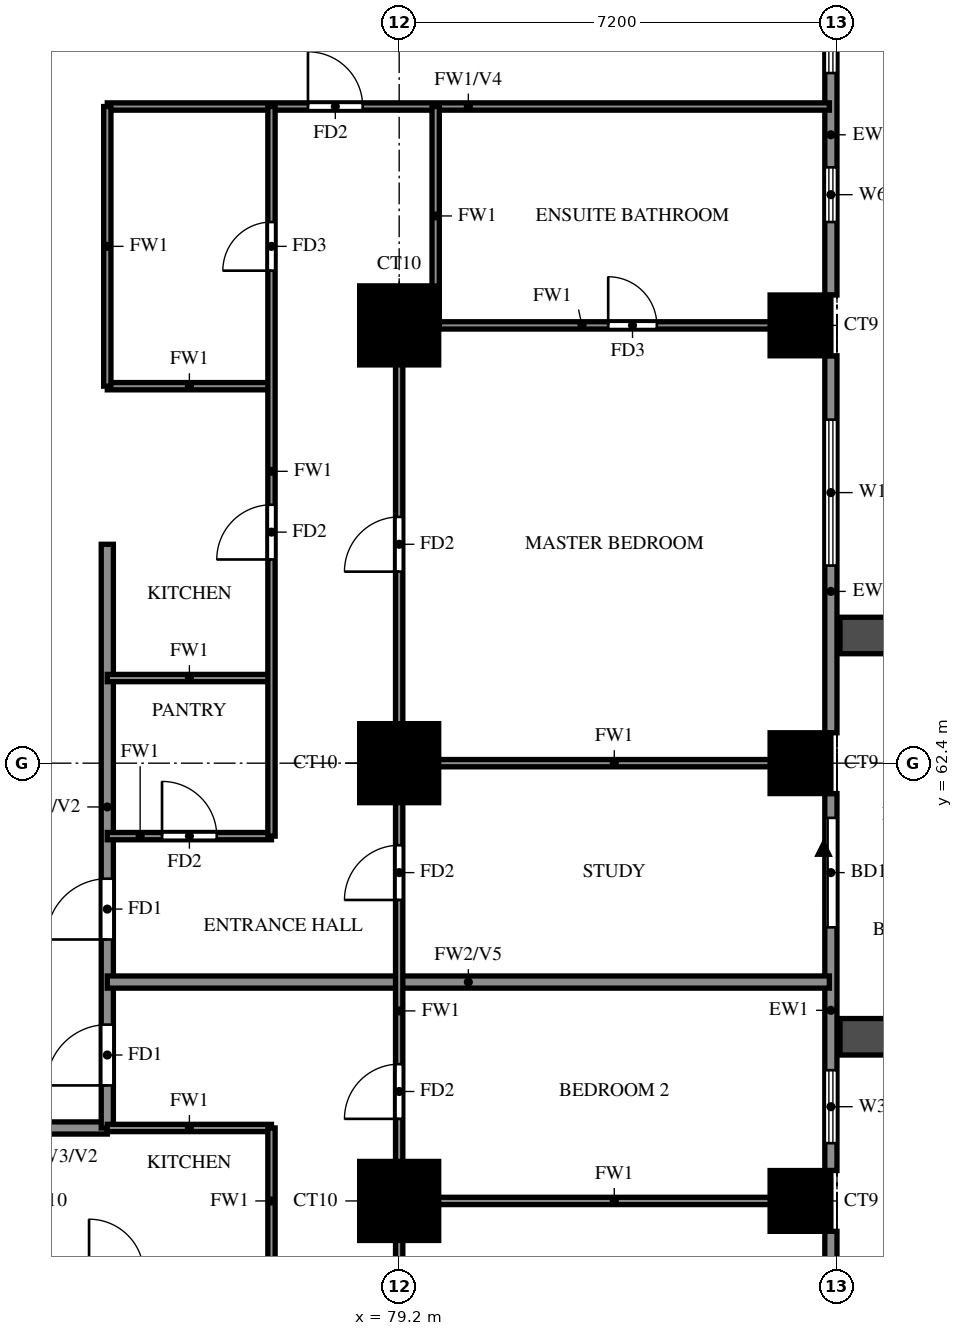
"""IFC4 building model, lengths in metres.
Left out: names, types, materials, properties, quantities, classifications, styles, units other than length and angle.
Written with IfcOpenShell. Run it as: python <this file> out.ifc"""

import sys

from ifc_helpers import new_model, si_unit, direction, frame, frame_2d, origin, origin_2d, place, context, subcontext, project, spatial, rectangle, extrude, source, transform, mapped, element, fill, save


model = new_model("IFC4")
c1 = context("Model", 3, precision=1e-05, world=origin(), true_north=direction((0.0, 1.0)))
c2 = subcontext(c1, "Body", "Model", "MODEL_VIEW")
j1 = project(units=[si_unit("LENGTHUNIT", "METRE"), si_unit("PLANEANGLEUNIT", "RADIAN")], contexts=[c1])
p1 = place(None, origin())
s1 = spatial("IfcSite", under=j1, at=p1, CompositionType="ELEMENT")
p2 = place(p1, origin())
s2 = spatial("IfcBuilding", under=s1, at=p2, CompositionType="ELEMENT")
p3 = place(p2, frame((0.0, 0.0, 83.0)))
s3 = spatial("IfcBuildingStorey", under=s2, at=p3, CompositionType="ELEMENT", Elevation=83.0)
m1 = source(origin(), c2, "Body", "SweptSolid", [
    extrude(rectangle(XDim=1.3, YDim=1.3, at=origin_2d()), origin(), (0.0, 0.0, 1.0), 3.18),
])
p4 = place(p3, frame((79.2, 55.2, 0.0), z_axis=(0.0, 0.0, 1.0), x_axis=(1.0, 0.0, 0.0)))
e1 = element("IfcColumn", 1, at=p4, inside=s3, PredefinedType="COLUMN", context=c2, shape_type="MappedRepresentation", body=[
    mapped(m1, transform((0.0, 0.0, 0.0))),
])
m2 = source(origin(), c2, "Body", "SweptSolid", [
    extrude(rectangle(XDim=1.0, YDim=1.0, at=origin_2d()), origin(), (0.0, 0.0, 1.0), 3.18),
])
p5 = place(p3, frame((85.8, 55.2, 0.0), z_axis=(0.0, 0.0, 1.0), x_axis=(1.0, 0.0, 0.0)))
e2 = element("IfcColumn", 2, at=p5, inside=s3, PredefinedType="COLUMN", context=c2, shape_type="MappedRepresentation", body=[
    mapped(m2, transform((0.0, 0.0, 0.0))),
])
p6 = place(p3, frame((79.2, 62.4, 0.0), z_axis=(0.0, 0.0, 1.0), x_axis=(1.0, 0.0, 0.0)))
e3 = element("IfcColumn", 3, at=p6, inside=s3, PredefinedType="COLUMN", context=c2, shape_type="MappedRepresentation", body=[
    mapped(m1, transform((0.0, 0.0, 0.0))),
])
p7 = place(p3, frame((85.8, 62.4, 0.0), z_axis=(0.0, 0.0, 1.0), x_axis=(1.0, 0.0, 0.0)))
e4 = element("IfcColumn", 4, at=p7, inside=s3, PredefinedType="COLUMN", context=c2, shape_type="MappedRepresentation", body=[
    mapped(m2, transform((0.0, 0.0, 0.0))),
])
p8 = place(p3, frame((79.2, 69.6, 0.0), z_axis=(0.0, 0.0, 1.0), x_axis=(1.0, 0.0, 0.0)))
e5 = element("IfcColumn", 5, at=p8, inside=s3, PredefinedType="COLUMN", context=c2, shape_type="MappedRepresentation", body=[
    mapped(m1, transform((0.0, 0.0, 0.0))),
])
p9 = place(p3, frame((85.8, 69.6, 0.0), z_axis=(0.0, 0.0, 1.0), x_axis=(1.0, 0.0, 0.0)))
e6 = element("IfcColumn", 6, at=p9, inside=s3, PredefinedType="COLUMN", context=c2, shape_type="MappedRepresentation", body=[
    mapped(m2, transform((0.0, 0.0, 0.0))),
])
p10 = place(p3, frame((86.3, 48.5, 0.0), z_axis=(0.0, 0.0, 1.0), x_axis=(0.0, 1.0, 0.0)))
e7 = element("IfcWall", 7, at=p10, inside=s3, PredefinedType="SOLIDWALL", context=c2, shape_type="SweptSolid", body=[
    extrude(rectangle(XDim=6.2, YDim=0.2, at=frame_2d((3.1, 0.0))), origin(), (0.0, 0.0, 1.0), 3.18),
])
p11 = place(p10, frame((1.9, 0.0, 0.6)))
e8 = element("IfcOpeningElement", 8, at=p11, cuts=e7, PredefinedType="OPENING", context=c2, shape_type="SweptSolid", body=[
    extrude(rectangle(XDim=2.4, YDim=2.4, at=frame_2d((1.2, 1.2))), frame((0.0, 0.11, 0.0), z_axis=(0.0, -1.0, 0.0), x_axis=(1.0, 0.0, 0.0)), (0.0, 0.0, 1.0), 0.22),
])
p12 = place(p3, frame((86.3, 55.7, 0.0), z_axis=(0.0, 0.0, 1.0), x_axis=(0.0, 1.0, 0.0)))
e9 = element("IfcWall", 9, at=p12, inside=s3, PredefinedType="SOLIDWALL", context=c2, shape_type="SweptSolid", body=[
    extrude(rectangle(XDim=6.2, YDim=0.2, at=frame_2d((3.1, 0.0))), origin(), (0.0, 0.0, 1.0), 3.18),
])
p13 = place(p12, frame((4.0, 0.0, 0.0)))
e10 = element("IfcOpeningElement", 10, at=p13, cuts=e9, PredefinedType="OPENING", context=c2, shape_type="SweptSolid", body=[
    extrude(rectangle(XDim=1.8, YDim=2.4, at=frame_2d((0.9, 1.2))), frame((0.0, 0.11, 0.0), z_axis=(0.0, -1.0, 0.0), x_axis=(1.0, 0.0, 0.0)), (0.0, 0.0, 1.0), 0.22),
])
p14 = place(p12, frame((0.45, 0.0, 0.6)))
e11 = element("IfcOpeningElement", 11, at=p14, cuts=e9, PredefinedType="OPENING", context=c2, shape_type="SweptSolid", body=[
    extrude(rectangle(XDim=1.2, YDim=2.4, at=frame_2d((0.6, 1.2))), frame((0.0, 0.11, 0.0), z_axis=(0.0, -1.0, 0.0), x_axis=(1.0, 0.0, 0.0)), (0.0, 0.0, 1.0), 0.22),
])
p15 = place(p3, frame((86.3, 62.9, 0.0), z_axis=(0.0, 0.0, 1.0), x_axis=(0.0, 1.0, 0.0)))
e12 = element("IfcWall", 12, at=p15, inside=s3, PredefinedType="SOLIDWALL", context=c2, shape_type="SweptSolid", body=[
    extrude(rectangle(XDim=6.2, YDim=0.2, at=frame_2d((3.1, 0.0))), origin(), (0.0, 0.0, 1.0), 3.18),
])
p16 = place(p15, frame((2.75, 0.0, 0.6)))
e13 = element("IfcOpeningElement", 13, at=p16, cuts=e12, PredefinedType="OPENING", context=c2, shape_type="SweptSolid", body=[
    extrude(rectangle(XDim=2.4, YDim=2.4, at=frame_2d((1.2, 1.2))), frame((0.0, 0.11, 0.0), z_axis=(0.0, -1.0, 0.0), x_axis=(1.0, 0.0, 0.0)), (0.0, 0.0, 1.0), 0.22),
])
p17 = place(p3, frame((86.3, 70.1, 0.0), z_axis=(0.0, 0.0, 1.0), x_axis=(0.0, 1.0, 0.0)))
e14 = element("IfcWall", 14, at=p17, inside=s3, PredefinedType="SOLIDWALL", context=c2, shape_type="SweptSolid", body=[
    extrude(rectangle(XDim=6.2, YDim=0.2, at=frame_2d((3.1, 0.0))), origin(), (0.0, 0.0, 1.0), 3.18),
])
p18 = place(p17, frame((1.2, 0.0, 1.5)))
e15 = element("IfcOpeningElement", 15, at=p18, cuts=e14, PredefinedType="OPENING", context=c2, shape_type="SweptSolid", body=[
    extrude(rectangle(XDim=0.9, YDim=0.9, at=frame_2d((0.45, 0.45))), frame((0.0, 0.11, 0.0), z_axis=(0.0, -1.0, 0.0), x_axis=(1.0, 0.0, 0.0)), (0.0, 0.0, 1.0), 0.22),
])
p19 = place(p17, frame((3.65, 0.0, 0.6)))
e16 = element("IfcOpeningElement", 16, at=p19, cuts=e14, PredefinedType="OPENING", context=c2, shape_type="SweptSolid", body=[
    extrude(rectangle(XDim=1.8, YDim=2.4, at=frame_2d((0.9, 1.2))), frame((0.0, 0.11, 0.0), z_axis=(0.0, -1.0, 0.0), x_axis=(1.0, 0.0, 0.0)), (0.0, 0.0, 1.0), 0.22),
])
for number, where, z_axis, x_axis in (
    (17, (86.45, 57.9, 0.0), (0.0, 0.0, 1.0), (1.0, 0.0, 0.0)),
    (18, (86.45, 64.5, 0.0), (0.0, 0.0, 1.0), (1.0, 0.0, 0.0)),
):
    element("IfcWall", number, at=place(p3, frame(where, z_axis=z_axis, x_axis=x_axis)), inside=s3, PredefinedType="SOLIDWALL", context=c2, shape_type="SweptSolid", body=[
        extrude(rectangle(XDim=2.65, YDim=0.6, at=frame_2d((1.325, 0.0))), origin(), (0.0, 0.0, 1.0), 2.85),
    ])
p20 = place(p3, frame((72.0, 56.4, 0.0), z_axis=(0.0, 0.0, 1.0), x_axis=(1.0, 0.0, 0.0)))
e19 = element("IfcWall", 19, at=p20, inside=s3, PredefinedType="SOLIDWALL", context=c2, shape_type="SweptSolid", body=[
    extrude(rectangle(XDim=2.4, YDim=0.2, at=frame_2d((1.2, 0.0))), origin(), (0.0, 0.0, 1.0), 3.18),
])
p21 = place(p3, frame((74.4, 56.4, 0.0), z_axis=(0.0, 0.0, 1.0), x_axis=(0.0, 1.0, 0.0)))
e20 = element("IfcWall", 20, at=p21, inside=s3, PredefinedType="SOLIDWALL", context=c2, shape_type="SweptSolid", body=[
    extrude(rectangle(XDim=9.6, YDim=0.2, at=frame_2d((4.8, 0.0))), origin(), (0.0, 0.0, 1.0), 3.18),
])
p22 = place(p21, frame((0.7, 0.0, 0.0)))
e21 = element("IfcOpeningElement", 21, at=p22, cuts=e20, PredefinedType="OPENING", context=c2, shape_type="SweptSolid", body=[
    extrude(rectangle(XDim=1.0, YDim=2.1, at=frame_2d((0.5, 1.05))), frame((0.0, 0.11, 0.0), z_axis=(0.0, -1.0, 0.0), x_axis=(1.0, 0.0, 0.0)), (0.0, 0.0, 1.0), 0.22),
])
p23 = place(p21, frame((3.1, 0.0, 0.0)))
e22 = element("IfcOpeningElement", 22, at=p23, cuts=e20, PredefinedType="OPENING", context=c2, shape_type="SweptSolid", body=[
    extrude(rectangle(XDim=1.0, YDim=2.1, at=frame_2d((0.5, 1.05))), frame((0.0, 0.11, 0.0), z_axis=(0.0, -1.0, 0.0), x_axis=(1.0, 0.0, 0.0)), (0.0, 0.0, 1.0), 0.22),
])
p24 = place(p3, frame((74.4, 58.8, 0.0), z_axis=(0.0, 0.0, 1.0), x_axis=(1.0, 0.0, 0.0)))
e23 = element("IfcWall", 23, at=p24, inside=s3, PredefinedType="SOLIDWALL", context=c2, shape_type="SweptSolid", body=[
    extrude(rectangle(XDim=11.875, YDim=0.2, at=frame_2d((5.938, 0.0))), origin(), (0.0, 0.0, 1.0), 2.28),
])
p25 = place(p3, frame((79.2, 55.2, 0.0), z_axis=(0.0, 0.0, 1.0), x_axis=(1.0, 0.0, 0.0)))
e24 = element("IfcWall", 24, at=p25, inside=s3, PredefinedType="PARTITIONING", context=c2, shape_type="SweptSolid", body=[
    extrude(rectangle(XDim=7.075, YDim=0.12, at=frame_2d((3.538, 0.0))), origin(), (0.0, 0.0, 1.0), 3.18),
])
p26 = place(p3, frame((74.4, 56.4, 0.0), z_axis=(0.0, 0.0, 1.0), x_axis=(1.0, 0.0, 0.0)))
e25 = element("IfcWall", 25, at=p26, inside=s3, PredefinedType="PARTITIONING", context=c2, shape_type="SweptSolid", body=[
    extrude(rectangle(XDim=2.7, YDim=0.12, at=frame_2d((1.35, 0.0))), origin(), (0.0, 0.0, 1.0), 3.18),
])
p27 = place(p3, frame((74.4, 61.2, 0.0), z_axis=(0.0, 0.0, 1.0), x_axis=(1.0, 0.0, 0.0)))
e26 = element("IfcWall", 26, at=p27, inside=s3, PredefinedType="PARTITIONING", context=c2, shape_type="SweptSolid", body=[
    extrude(rectangle(XDim=2.7, YDim=0.12, at=frame_2d((1.35, 0.0))), origin(), (0.0, 0.0, 1.0), 3.18),
])
p28 = place(p27, frame((0.9, 0.0, 0.0)))
e27 = element("IfcOpeningElement", 27, at=p28, cuts=e26, PredefinedType="OPENING", context=c2, shape_type="SweptSolid", body=[
    extrude(rectangle(XDim=0.9, YDim=2.1, at=frame_2d((0.45, 1.05))), frame((0.0, 0.07, 0.0), z_axis=(0.0, -1.0, 0.0), x_axis=(1.0, 0.0, 0.0)), (0.0, 0.0, 1.0), 0.14),
])
p29 = place(p3, frame((79.2, 62.4, 0.0), z_axis=(0.0, 0.0, 1.0), x_axis=(1.0, 0.0, 0.0)))
e28 = element("IfcWall", 28, at=p29, inside=s3, PredefinedType="PARTITIONING", context=c2, shape_type="SweptSolid", body=[
    extrude(rectangle(XDim=7.075, YDim=0.12, at=frame_2d((3.538, 0.0))), origin(), (0.0, 0.0, 1.0), 3.18),
])
for number, where, z_axis, x_axis in (
    (29, (74.4, 63.8, 0.0), (0.0, 0.0, 1.0), (1.0, 0.0, 0.0)),
    (30, (74.4, 68.6, 0.0), (0.0, 0.0, 1.0), (1.0, 0.0, 0.0)),
):
    element("IfcWall", number, at=place(p3, frame(where, z_axis=z_axis, x_axis=x_axis)), inside=s3, PredefinedType="PARTITIONING", context=c2, shape_type="SweptSolid", body=[
        extrude(rectangle(XDim=2.7, YDim=0.12, at=frame_2d((1.35, 0.0))), origin(), (0.0, 0.0, 1.0), 3.18),
    ])
p30 = place(p3, frame((79.2, 69.6, 0.0), z_axis=(0.0, 0.0, 1.0), x_axis=(1.0, 0.0, 0.0)))
e31 = element("IfcWall", 31, at=p30, inside=s3, PredefinedType="PARTITIONING", context=c2, shape_type="SweptSolid", body=[
    extrude(rectangle(XDim=7.075, YDim=0.12, at=frame_2d((3.538, 0.0))), origin(), (0.0, 0.0, 1.0), 3.18),
])
p31 = place(p30, frame((3.438, 0.0, 0.0)))
e32 = element("IfcOpeningElement", 32, at=p31, cuts=e31, PredefinedType="OPENING", context=c2, shape_type="SweptSolid", body=[
    extrude(rectangle(XDim=0.8, YDim=2.1, at=frame_2d((0.4, 1.05))), frame((0.0, 0.07, 0.0), z_axis=(0.0, -1.0, 0.0), x_axis=(1.0, 0.0, 0.0)), (0.0, 0.0, 1.0), 0.14),
])
p32 = place(p3, frame((74.4, 73.2, 0.0), z_axis=(0.0, 0.0, 1.0), x_axis=(1.0, 0.0, 0.0)))
e33 = element("IfcWall", 33, at=p32, inside=s3, PredefinedType="PARTITIONING", context=c2, shape_type="SweptSolid", body=[
    extrude(rectangle(XDim=11.875, YDim=0.12, at=frame_2d((5.938, 0.0))), origin(), (0.0, 0.0, 1.0), 2.28),
])
p33 = place(p32, frame((3.3, 0.0, 0.0)))
e34 = element("IfcOpeningElement", 34, at=p33, cuts=e33, PredefinedType="OPENING", context=c2, shape_type="SweptSolid", body=[
    extrude(rectangle(XDim=0.9, YDim=2.1, at=frame_2d((0.45, 1.05))), frame((0.0, 0.07, 0.0), z_axis=(0.0, -1.0, 0.0), x_axis=(1.0, 0.0, 0.0)), (0.0, 0.0, 1.0), 0.14),
])
p34 = place(p3, frame((74.4, 68.6, 0.0), z_axis=(0.0, 0.0, 1.0), x_axis=(0.0, 1.0, 0.0)))
e35 = element("IfcWall", 35, at=p34, inside=s3, PredefinedType="PARTITIONING", context=c2, shape_type="SweptSolid", body=[
    extrude(rectangle(XDim=4.6, YDim=0.12, at=frame_2d((2.3, 0.0))), origin(), (0.0, 0.0, 1.0), 3.18),
])
p35 = place(p3, frame((77.1, 54.0, 0.0), z_axis=(0.0, 0.0, 1.0), x_axis=(0.0, 1.0, 0.0)))
e36 = element("IfcWall", 36, at=p35, inside=s3, PredefinedType="PARTITIONING", context=c2, shape_type="SweptSolid", body=[
    extrude(rectangle(XDim=2.4, YDim=0.12, at=frame_2d((1.2, 0.0))), origin(), (0.0, 0.0, 1.0), 3.18),
])
p36 = place(p3, frame((77.1, 61.2, 0.0), z_axis=(0.0, 0.0, 1.0), x_axis=(0.0, 1.0, 0.0)))
e37 = element("IfcWall", 37, at=p36, inside=s3, PredefinedType="PARTITIONING", context=c2, shape_type="SweptSolid", body=[
    extrude(rectangle(XDim=12.0, YDim=0.12, at=frame_2d((6.0, 0.0))), origin(), (0.0, 0.0, 1.0), 3.18),
])
p37 = place(p36, frame((4.55, 0.0, 0.0)))
e38 = element("IfcOpeningElement", 38, at=p37, cuts=e37, PredefinedType="OPENING", context=c2, shape_type="SweptSolid", body=[
    extrude(rectangle(XDim=0.9, YDim=2.1, at=frame_2d((0.45, 1.05))), frame((0.0, 0.07, 0.0), z_axis=(0.0, -1.0, 0.0), x_axis=(1.0, 0.0, 0.0)), (0.0, 0.0, 1.0), 0.14),
])
p38 = place(p36, frame((9.3, 0.0, 0.0)))
e39 = element("IfcOpeningElement", 39, at=p38, cuts=e37, PredefinedType="OPENING", context=c2, shape_type="SweptSolid", body=[
    extrude(rectangle(XDim=0.8, YDim=2.1, at=frame_2d((0.4, 1.05))), frame((0.0, 0.07, 0.0), z_axis=(0.0, -1.0, 0.0), x_axis=(1.0, 0.0, 0.0)), (0.0, 0.0, 1.0), 0.14),
])
p39 = place(p3, frame((79.2, 48.125, 0.0), z_axis=(0.0, 0.0, 1.0), x_axis=(0.0, 1.0, 0.0)))
e40 = element("IfcWall", 40, at=p39, inside=s3, PredefinedType="PARTITIONING", context=c2, shape_type="SweptSolid", body=[
    extrude(rectangle(XDim=21.475, YDim=0.12, at=frame_2d((10.738, 0.0))), origin(), (0.0, 0.0, 1.0), 3.18),
])
p40 = place(p39, frame((2.788, 0.0, 0.0)))
e41 = element("IfcOpeningElement", 41, at=p40, cuts=e40, PredefinedType="OPENING", context=c2, shape_type="SweptSolid", body=[
    extrude(rectangle(XDim=1.5, YDim=2.1, at=frame_2d((0.75, 1.05))), frame((0.0, 0.07, 0.0), z_axis=(0.0, -1.0, 0.0), x_axis=(1.0, 0.0, 0.0)), (0.0, 0.0, 1.0), 0.14),
])
p41 = place(p39, frame((8.425, 0.0, 0.0)))
e42 = element("IfcOpeningElement", 42, at=p41, cuts=e40, PredefinedType="OPENING", context=c2, shape_type="SweptSolid", body=[
    extrude(rectangle(XDim=0.9, YDim=2.1, at=frame_2d((0.45, 1.05))), frame((0.0, 0.07, 0.0), z_axis=(0.0, -1.0, 0.0), x_axis=(1.0, 0.0, 0.0)), (0.0, 0.0, 1.0), 0.14),
])
p42 = place(p39, frame((12.025, 0.0, 0.0)))
e43 = element("IfcOpeningElement", 43, at=p42, cuts=e40, PredefinedType="OPENING", context=c2, shape_type="SweptSolid", body=[
    extrude(rectangle(XDim=0.9, YDim=2.1, at=frame_2d((0.45, 1.05))), frame((0.0, 0.07, 0.0), z_axis=(0.0, -1.0, 0.0), x_axis=(1.0, 0.0, 0.0)), (0.0, 0.0, 1.0), 0.14),
])
p43 = place(p39, frame((17.425, 0.0, 0.0)))
e44 = element("IfcOpeningElement", 44, at=p43, cuts=e40, PredefinedType="OPENING", context=c2, shape_type="SweptSolid", body=[
    extrude(rectangle(XDim=0.9, YDim=2.1, at=frame_2d((0.45, 1.05))), frame((0.0, 0.07, 0.0), z_axis=(0.0, -1.0, 0.0), x_axis=(1.0, 0.0, 0.0)), (0.0, 0.0, 1.0), 0.14),
])
p44 = place(p3, frame((79.8, 69.6, 0.0), z_axis=(0.0, 0.0, 1.0), x_axis=(0.0, 1.0, 0.0)))
e45 = element("IfcWall", 45, at=p44, inside=s3, PredefinedType="PARTITIONING", context=c2, shape_type="SweptSolid", body=[
    extrude(rectangle(XDim=3.6, YDim=0.12, at=frame_2d((1.8, 0.0))), origin(), (0.0, 0.0, 1.0), 3.18),
])
p45 = place(p13, origin())
e46 = element("IfcDoor", 46, at=p45, inside=s3, OperationType="DOUBLE_DOOR_SLIDING", PredefinedType="DOOR", context=c2, shape_type="SweptSolid", body=[
    extrude(rectangle(XDim=1.8, YDim=2.4, at=frame_2d((0.9, 1.2))), frame((0.0, 0.025, 0.0), z_axis=(0.0, -1.0, 0.0), x_axis=(1.0, 0.0, 0.0)), (0.0, 0.0, 1.0), 0.05),
])
fill(e10, e46)
p46 = place(p14, origin())
e47 = element("IfcWindow", 47, at=p46, inside=s3, PartitioningType="SINGLE_PANEL", PredefinedType="WINDOW", context=c2, shape_type="SweptSolid", body=[
    extrude(rectangle(XDim=1.2, YDim=2.4, at=frame_2d((0.6, 1.2))), frame((0.0, 0.03, 0.0), z_axis=(0.0, -1.0, 0.0), x_axis=(1.0, 0.0, 0.0)), (0.0, 0.0, 1.0), 0.06),
])
fill(e11, e47)
p47 = place(p16, origin())
e48 = element("IfcWindow", 48, at=p47, inside=s3, PartitioningType="DOUBLE_PANEL_VERTICAL", PredefinedType="WINDOW", context=c2, shape_type="SweptSolid", body=[
    extrude(rectangle(XDim=2.4, YDim=2.4, at=frame_2d((1.2, 1.2))), frame((0.0, 0.03, 0.0), z_axis=(0.0, -1.0, 0.0), x_axis=(1.0, 0.0, 0.0)), (0.0, 0.0, 1.0), 0.06),
])
fill(e13, e48)
p48 = place(p18, origin())
e49 = element("IfcWindow", 49, at=p48, inside=s3, PartitioningType="SINGLE_PANEL", PredefinedType="WINDOW", context=c2, shape_type="SweptSolid", body=[
    extrude(rectangle(XDim=0.9, YDim=0.9, at=frame_2d((0.45, 0.45))), frame((0.0, 0.03, 0.0), z_axis=(0.0, -1.0, 0.0), x_axis=(1.0, 0.0, 0.0)), (0.0, 0.0, 1.0), 0.06),
])
fill(e15, e49)
p49 = place(p19, origin())
e50 = element("IfcWindow", 50, at=p49, inside=s3, PartitioningType="DOUBLE_PANEL_VERTICAL", PredefinedType="WINDOW", context=c2, shape_type="SweptSolid", body=[
    extrude(rectangle(XDim=1.8, YDim=2.4, at=frame_2d((0.9, 1.2))), frame((0.0, 0.03, 0.0), z_axis=(0.0, -1.0, 0.0), x_axis=(1.0, 0.0, 0.0)), (0.0, 0.0, 1.0), 0.06),
])
fill(e16, e50)
p50 = place(p22, origin())
e51 = element("IfcDoor", 51, at=p50, inside=s3, OperationType="SINGLE_SWING_LEFT", PredefinedType="DOOR", context=c2, shape_type="SweptSolid", body=[
    extrude(rectangle(XDim=1.0, YDim=2.1, at=frame_2d((0.5, 1.05))), frame((0.0, 0.025, 0.0), z_axis=(0.0, -1.0, 0.0), x_axis=(1.0, 0.0, 0.0)), (0.0, 0.0, 1.0), 0.05),
])
fill(e21, e51)
p51 = place(p41, origin())
e52 = element("IfcDoor", 52, at=p51, inside=s3, OperationType="SINGLE_SWING_LEFT", PredefinedType="DOOR", context=c2, shape_type="SweptSolid", body=[
    extrude(rectangle(XDim=0.9, YDim=2.1, at=frame_2d((0.45, 1.05))), frame((0.0, 0.025, 0.0), z_axis=(0.0, -1.0, 0.0), x_axis=(1.0, 0.0, 0.0)), (0.0, 0.0, 1.0), 0.05),
])
fill(e42, e52)
p52 = place(p23, origin())
e53 = element("IfcDoor", 53, at=p52, inside=s3, OperationType="SINGLE_SWING_RIGHT", PredefinedType="DOOR", context=c2, shape_type="SweptSolid", body=[
    extrude(rectangle(XDim=1.0, YDim=2.1, at=frame_2d((0.5, 1.05))), frame((0.0, 0.025, 0.0), z_axis=(0.0, -1.0, 0.0), x_axis=(1.0, 0.0, 0.0)), (0.0, 0.0, 1.0), 0.05),
])
fill(e22, e53)
p53 = place(p42, origin())
e54 = element("IfcDoor", 54, at=p53, inside=s3, OperationType="SINGLE_SWING_LEFT", PredefinedType="DOOR", context=c2, shape_type="SweptSolid", body=[
    extrude(rectangle(XDim=0.9, YDim=2.1, at=frame_2d((0.45, 1.05))), frame((0.0, 0.025, 0.0), z_axis=(0.0, -1.0, 0.0), x_axis=(1.0, 0.0, 0.0)), (0.0, 0.0, 1.0), 0.05),
])
fill(e43, e54)
p54 = place(p43, origin())
e55 = element("IfcDoor", 55, at=p54, inside=s3, OperationType="SINGLE_SWING_LEFT", PredefinedType="DOOR", context=c2, shape_type="SweptSolid", body=[
    extrude(rectangle(XDim=0.9, YDim=2.1, at=frame_2d((0.45, 1.05))), frame((0.0, 0.025, 0.0), z_axis=(0.0, -1.0, 0.0), x_axis=(1.0, 0.0, 0.0)), (0.0, 0.0, 1.0), 0.05),
])
fill(e44, e55)
p55 = place(p31, origin())
e56 = element("IfcDoor", 56, at=p55, inside=s3, OperationType="SINGLE_SWING_RIGHT", PredefinedType="DOOR", context=c2, shape_type="SweptSolid", body=[
    extrude(rectangle(XDim=0.8, YDim=2.1, at=frame_2d((0.4, 1.05))), frame((0.0, 0.025, 0.0), z_axis=(0.0, -1.0, 0.0), x_axis=(1.0, 0.0, 0.0)), (0.0, 0.0, 1.0), 0.05),
])
fill(e32, e56)
p56 = place(p33, origin())
e57 = element("IfcDoor", 57, at=p56, inside=s3, OperationType="SINGLE_SWING_LEFT", PredefinedType="DOOR", context=c2, shape_type="SweptSolid", body=[
    extrude(rectangle(XDim=0.9, YDim=2.1, at=frame_2d((0.45, 1.05))), frame((0.0, 0.025, 0.0), z_axis=(0.0, -1.0, 0.0), x_axis=(1.0, 0.0, 0.0)), (0.0, 0.0, 1.0), 0.05),
])
fill(e34, e57)
p57 = place(p28, origin())
e58 = element("IfcDoor", 58, at=p57, inside=s3, OperationType="SINGLE_SWING_LEFT", PredefinedType="DOOR", context=c2, shape_type="SweptSolid", body=[
    extrude(rectangle(XDim=0.9, YDim=2.1, at=frame_2d((0.45, 1.05))), frame((0.0, 0.025, 0.0), z_axis=(0.0, -1.0, 0.0), x_axis=(1.0, 0.0, 0.0)), (0.0, 0.0, 1.0), 0.05),
])
fill(e27, e58)
p58 = place(p37, origin())
e59 = element("IfcDoor", 59, at=p58, inside=s3, OperationType="SINGLE_SWING_RIGHT", PredefinedType="DOOR", context=c2, shape_type="SweptSolid", body=[
    extrude(rectangle(XDim=0.9, YDim=2.1, at=frame_2d((0.45, 1.05))), frame((0.0, 0.025, 0.0), z_axis=(0.0, -1.0, 0.0), x_axis=(1.0, 0.0, 0.0)), (0.0, 0.0, 1.0), 0.05),
])
fill(e38, e59)
p59 = place(p38, origin())
e60 = element("IfcDoor", 60, at=p59, inside=s3, OperationType="SINGLE_SWING_LEFT", PredefinedType="DOOR", context=c2, shape_type="SweptSolid", body=[
    extrude(rectangle(XDim=0.8, YDim=2.1, at=frame_2d((0.4, 1.05))), frame((0.0, 0.025, 0.0), z_axis=(0.0, -1.0, 0.0), x_axis=(1.0, 0.0, 0.0)), (0.0, 0.0, 1.0), 0.05),
])
fill(e39, e60)
save(model, sys.argv[1])
